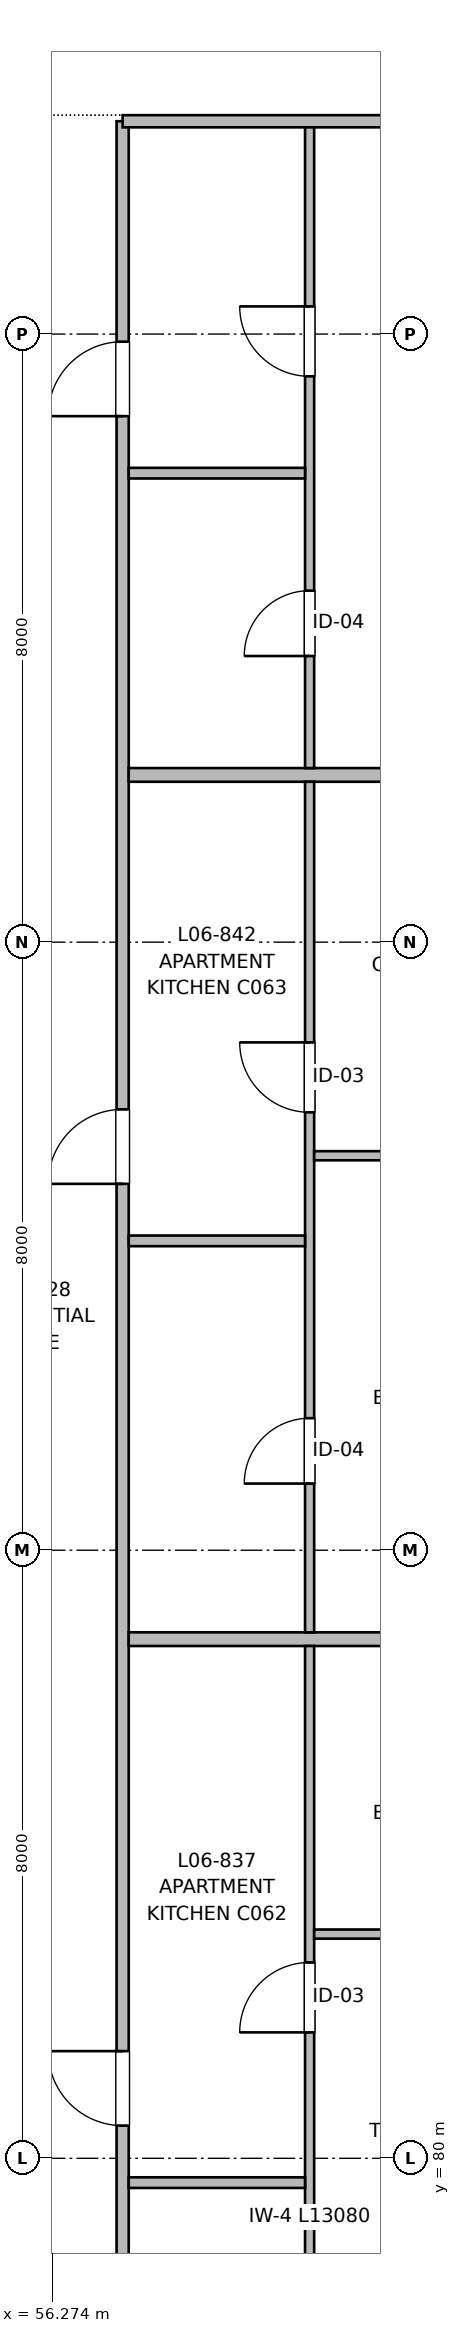
"""IFC4 building model, lengths in metres.
Left out: names, types, materials, properties, quantities, classifications, styles, units other than length and angle.
Written with IfcOpenShell. Run it as: python <this file> out.ifc"""

import sys

from ifc_helpers import new_model, si_unit, direction, frame, frame_2d, origin, place, context, subcontext, project, spatial, rectangle, extrude, element, fill, save


model = new_model("IFC4")
c1 = context("Model", 3, precision=1e-05, world=origin(), true_north=direction((0.0, 1.0)))
c2 = subcontext(c1, "Body", "Model", "MODEL_VIEW")
j1 = project(units=[si_unit("LENGTHUNIT", "METRE"), si_unit("PLANEANGLEUNIT", "RADIAN")], contexts=[c1])
p1 = place(None, origin())
s1 = spatial("IfcSite", under=j1, at=p1, CompositionType="ELEMENT")
p2 = place(p1, origin())
s2 = spatial("IfcBuilding", under=s1, at=p2, CompositionType="ELEMENT")
p3 = place(p2, frame((0.0, 0.0, 20.16)))
s3 = spatial("IfcBuildingStorey", under=s2, at=p3, CompositionType="ELEMENT", Elevation=20.16)
p4 = place(p3, frame((57.2, 59.36, 0.0), z_axis=(0.0, 0.0, 1.0), x_axis=(0.0, 1.0, 0.0)))
e1 = element("IfcWall", 1, at=p4, inside=s3, PredefinedType="PARTITIONING", context=c2, shape_type="SweptSolid", body=[
    extrude(rectangle(XDim=47.44, YDim=0.16, at=frame_2d((23.72, 0.0))), origin(), (0.0, 0.0, 1.0), 2.935),
])
p5 = place(p4, frame((7.25, 0.0, 0.0)))
e2 = element("IfcOpeningElement", 2, at=p5, cuts=e1, PredefinedType="OPENING", context=c2, shape_type="SweptSolid", body=[
    extrude(rectangle(XDim=0.98, YDim=2.15, at=frame_2d((0.49, 1.075))), frame((0.0, 0.09, 0.0), z_axis=(0.0, -1.0, 0.0), x_axis=(1.0, 0.0, 0.0)), (0.0, 0.0, 1.0), 0.18),
])
p6 = place(p4, frame((21.07, 0.0, 0.0)))
e3 = element("IfcOpeningElement", 3, at=p6, cuts=e1, PredefinedType="OPENING", context=c2, shape_type="SweptSolid", body=[
    extrude(rectangle(XDim=0.98, YDim=2.15, at=frame_2d((0.49, 1.075))), frame((0.0, 0.09, 0.0), z_axis=(0.0, -1.0, 0.0), x_axis=(1.0, 0.0, 0.0)), (0.0, 0.0, 1.0), 0.18),
])
p7 = place(p4, frame((33.46, 0.0, 0.0)))
e4 = element("IfcOpeningElement", 4, at=p7, cuts=e1, PredefinedType="OPENING", context=c2, shape_type="SweptSolid", body=[
    extrude(rectangle(XDim=0.98, YDim=2.15, at=frame_2d((0.49, 1.075))), frame((0.0, 0.09, 0.0), z_axis=(0.0, -1.0, 0.0), x_axis=(1.0, 0.0, 0.0)), (0.0, 0.0, 1.0), 0.18),
])
p8 = place(p4, frame((43.56, 0.0, 0.0)))
e5 = element("IfcOpeningElement", 5, at=p8, cuts=e1, PredefinedType="OPENING", context=c2, shape_type="SweptSolid", body=[
    extrude(rectangle(XDim=0.98, YDim=2.15, at=frame_2d((0.49, 1.075))), frame((0.0, 0.09, 0.0), z_axis=(0.0, -1.0, 0.0), x_axis=(1.0, 0.0, 0.0)), (0.0, 0.0, 1.0), 0.18),
])
p9 = place(p3, frame((57.2, 106.8, 0.0), z_axis=(0.0, 0.0, 1.0), x_axis=(1.0, 0.0, 0.0)))
e6 = element("IfcWall", 6, at=p9, inside=s3, PredefinedType="PARTITIONING", context=c2, shape_type="SweptSolid", body=[
    extrude(rectangle(XDim=24.14, YDim=0.16, at=frame_2d((12.07, 0.0))), origin(), (0.0, 0.0, 1.0), 2.935),
])
p10 = place(p9, frame((19.575, 0.0, 0.0)))
e7 = element("IfcOpeningElement", 7, at=p10, cuts=e6, PredefinedType="OPENING", context=c2, shape_type="SweptSolid", body=[
    extrude(rectangle(XDim=1.05, YDim=2.15, at=frame_2d((0.525, 1.075))), frame((0.0, 0.09, 0.0), z_axis=(0.0, -1.0, 0.0), x_axis=(1.0, 0.0, 0.0)), (0.0, 0.0, 1.0), 0.18),
])
p11 = place(p9, frame((8.995, 0.0, 0.0)))
e8 = element("IfcOpeningElement", 8, at=p11, cuts=e6, PredefinedType="OPENING", context=c2, shape_type="SweptSolid", body=[
    extrude(rectangle(XDim=0.98, YDim=2.15, at=frame_2d((0.49, 1.075))), frame((0.0, 0.09, 0.0), z_axis=(0.0, -1.0, 0.0), x_axis=(1.0, 0.0, 0.0)), (0.0, 0.0, 1.0), 0.18),
])
p12 = place(p3, frame((57.28, 86.83, 0.0), z_axis=(0.0, 0.0, 1.0), x_axis=(1.0, 0.0, 0.0)))
e9 = element("IfcWall", 9, at=p12, inside=s3, PredefinedType="PARTITIONING", context=c2, shape_type="SweptSolid", body=[
    extrude(rectangle(XDim=6.6, YDim=0.18, at=frame_2d((3.3, 0.0))), origin(), (0.0, 0.0, 1.0), 2.935),
])
p13 = place(p3, frame((57.28, 98.2, 0.0), z_axis=(0.0, 0.0, 1.0), x_axis=(1.0, 0.0, 0.0)))
e10 = element("IfcWall", 10, at=p13, inside=s3, PredefinedType="PARTITIONING", context=c2, shape_type="SweptSolid", body=[
    extrude(rectangle(XDim=16.412, YDim=0.18, at=frame_2d((8.206, 0.0))), origin(), (0.0, 0.0, 1.0), 2.935),
])
p14 = place(p3, frame((59.66, 73.66, 0.0), z_axis=(0.0, 0.0, 1.0), x_axis=(0.0, 1.0, 0.0)))
e11 = element("IfcWall", 11, at=p14, inside=s3, PredefinedType="PARTITIONING", context=c2, shape_type="SweptSolid", body=[
    extrude(rectangle(XDim=13.08, YDim=0.12, at=frame_2d((6.54, 0.0))), origin(), (0.0, 0.0, 1.0), 2.935),
])
p15 = place(p14, frame((2.288, 0.0, 0.0)))
e12 = element("IfcOpeningElement", 12, at=p15, cuts=e11, PredefinedType="OPENING", context=c2, shape_type="SweptSolid", body=[
    extrude(rectangle(XDim=0.86, YDim=2.1, at=frame_2d((0.43, 1.05))), frame((0.0, 0.07, 0.0), z_axis=(0.0, -1.0, 0.0), x_axis=(1.0, 0.0, 0.0)), (0.0, 0.0, 1.0), 0.14),
])
p16 = place(p14, frame((7.997, 0.0, 0.0)))
e13 = element("IfcOpeningElement", 13, at=p16, cuts=e11, PredefinedType="OPENING", context=c2, shape_type="SweptSolid", body=[
    extrude(rectangle(XDim=0.92, YDim=2.1, at=frame_2d((0.46, 1.05))), frame((0.0, 0.07, 0.0), z_axis=(0.0, -1.0, 0.0), x_axis=(1.0, 0.0, 0.0)), (0.0, 0.0, 1.0), 0.14),
])
p17 = place(p3, frame((57.28, 79.68, 0.0), z_axis=(0.0, 0.0, 1.0), x_axis=(1.0, 0.0, 0.0)))
e14 = element("IfcWall", 14, at=p17, inside=s3, PredefinedType="PARTITIONING", context=c2, shape_type="SweptSolid", body=[
    extrude(rectangle(XDim=2.32, YDim=0.14, at=frame_2d((1.16, 0.0))), origin(), (0.0, 0.0, 1.0), 2.935),
])
p18 = place(p3, frame((59.72, 82.95, 0.0), z_axis=(0.0, 0.0, 1.0), x_axis=(1.0, 0.0, 0.0)))
e15 = element("IfcWall", 15, at=p18, inside=s3, PredefinedType="PARTITIONING", context=c2, shape_type="SweptSolid", body=[
    extrude(rectangle(XDim=4.16, YDim=0.12, at=frame_2d((2.08, 0.0))), origin(), (0.0, 0.0, 1.0), 2.935),
])
p19 = place(p18, frame((1.64, 0.0, 0.0)))
e16 = element("IfcOpeningElement", 16, at=p19, cuts=e15, PredefinedType="OPENING", context=c2, shape_type="SweptSolid", body=[
    extrude(rectangle(XDim=0.88, YDim=2.1, at=frame_2d((0.44, 1.05))), frame((0.0, 0.07, 0.0), z_axis=(0.0, -1.0, 0.0), x_axis=(1.0, 0.0, 0.0)), (0.0, 0.0, 1.0), 0.14),
])
p20 = place(p3, frame((59.66, 86.92, 0.0), z_axis=(0.0, 0.0, 1.0), x_axis=(0.0, 1.0, 0.0)))
e17 = element("IfcWall", 17, at=p20, inside=s3, PredefinedType="PARTITIONING", context=c2, shape_type="SweptSolid", body=[
    extrude(rectangle(XDim=11.19, YDim=0.12, at=frame_2d((5.595, 0.0))), origin(), (0.0, 0.0, 1.0), 2.935),
])
p21 = place(p20, frame((1.957, 0.0, 0.0)))
e18 = element("IfcOpeningElement", 18, at=p21, cuts=e17, PredefinedType="OPENING", context=c2, shape_type="SweptSolid", body=[
    extrude(rectangle(XDim=0.86, YDim=2.1, at=frame_2d((0.43, 1.05))), frame((0.0, 0.07, 0.0), z_axis=(0.0, -1.0, 0.0), x_axis=(1.0, 0.0, 0.0)), (0.0, 0.0, 1.0), 0.14),
])
p22 = place(p20, frame((6.841, 0.0, 0.0)))
e19 = element("IfcOpeningElement", 19, at=p22, cuts=e17, PredefinedType="OPENING", context=c2, shape_type="SweptSolid", body=[
    extrude(rectangle(XDim=0.92, YDim=2.1, at=frame_2d((0.46, 1.05))), frame((0.0, 0.07, 0.0), z_axis=(0.0, -1.0, 0.0), x_axis=(1.0, 0.0, 0.0)), (0.0, 0.0, 1.0), 0.14),
])
p23 = place(p3, frame((57.28, 92.07, 0.0), z_axis=(0.0, 0.0, 1.0), x_axis=(1.0, 0.0, 0.0)))
e20 = element("IfcWall", 20, at=p23, inside=s3, PredefinedType="PARTITIONING", context=c2, shape_type="SweptSolid", body=[
    extrude(rectangle(XDim=2.32, YDim=0.14, at=frame_2d((1.16, 0.0))), origin(), (0.0, 0.0, 1.0), 2.935),
])
p24 = place(p3, frame((59.72, 93.19, 0.0), z_axis=(0.0, 0.0, 1.0), x_axis=(1.0, 0.0, 0.0)))
e21 = element("IfcWall", 21, at=p24, inside=s3, PredefinedType="PARTITIONING", context=c2, shape_type="SweptSolid", body=[
    extrude(rectangle(XDim=8.537, YDim=0.12, at=frame_2d((4.269, 0.0))), origin(), (0.0, 0.0, 1.0), 2.935),
])
p25 = place(p24, frame((1.63, 0.0, 0.0)))
e22 = element("IfcOpeningElement", 22, at=p25, cuts=e21, PredefinedType="OPENING", context=c2, shape_type="SweptSolid", body=[
    extrude(rectangle(XDim=0.9, YDim=2.1, at=frame_2d((0.45, 1.05))), frame((0.0, 0.07, 0.0), z_axis=(0.0, -1.0, 0.0), x_axis=(1.0, 0.0, 0.0)), (0.0, 0.0, 1.0), 0.14),
])
p26 = place(p3, frame((59.66, 98.29, 0.0), z_axis=(0.0, 0.0, 1.0), x_axis=(0.0, 1.0, 0.0)))
e23 = element("IfcWall", 23, at=p26, inside=s3, PredefinedType="PARTITIONING", context=c2, shape_type="SweptSolid", body=[
    extrude(rectangle(XDim=8.43, YDim=0.12, at=frame_2d((4.215, 0.0))), origin(), (0.0, 0.0, 1.0), 2.935),
])
p27 = place(p26, frame((1.474, 0.0, 0.0)))
e24 = element("IfcOpeningElement", 24, at=p27, cuts=e23, PredefinedType="OPENING", context=c2, shape_type="SweptSolid", body=[
    extrude(rectangle(XDim=0.86, YDim=2.1, at=frame_2d((0.43, 1.05))), frame((0.0, 0.07, 0.0), z_axis=(0.0, -1.0, 0.0), x_axis=(1.0, 0.0, 0.0)), (0.0, 0.0, 1.0), 0.14),
])
p28 = place(p26, frame((5.154, 0.0, 0.0)))
e25 = element("IfcOpeningElement", 25, at=p28, cuts=e23, PredefinedType="OPENING", context=c2, shape_type="SweptSolid", body=[
    extrude(rectangle(XDim=0.92, YDim=2.1, at=frame_2d((0.46, 1.05))), frame((0.0, 0.07, 0.0), z_axis=(0.0, -1.0, 0.0), x_axis=(1.0, 0.0, 0.0)), (0.0, 0.0, 1.0), 0.14),
])
p29 = place(p3, frame((57.28, 102.17, 0.0), z_axis=(0.0, 0.0, 1.0), x_axis=(1.0, 0.0, 0.0)))
e26 = element("IfcWall", 26, at=p29, inside=s3, PredefinedType="PARTITIONING", context=c2, shape_type="SweptSolid", body=[
    extrude(rectangle(XDim=2.32, YDim=0.14, at=frame_2d((1.16, 0.0))), origin(), (0.0, 0.0, 1.0), 2.935),
])
p30 = place(p16, origin())
e27 = element("IfcDoor", 27, at=p30, inside=s3, OperationType="SINGLE_SWING_LEFT", PredefinedType="DOOR", context=c2, shape_type="SweptSolid", body=[
    extrude(rectangle(XDim=0.92, YDim=2.1, at=frame_2d((0.46, 1.05))), frame((0.0, 0.025, 0.0), z_axis=(0.0, -1.0, 0.0), x_axis=(1.0, 0.0, 0.0)), (0.0, 0.0, 1.0), 0.05),
])
fill(e13, e27)
p31 = place(p6, origin())
e28 = element("IfcDoor", 28, at=p31, inside=s3, OperationType="SINGLE_SWING_RIGHT", PredefinedType="DOOR", context=c2, shape_type="SweptSolid", body=[
    extrude(rectangle(XDim=0.98, YDim=2.15, at=frame_2d((0.49, 1.075))), frame((0.0, 0.025, 0.0), z_axis=(0.0, -1.0, 0.0), x_axis=(1.0, 0.0, 0.0)), (0.0, 0.0, 1.0), 0.05),
])
fill(e3, e28)
p32 = place(p21, origin())
e29 = element("IfcDoor", 29, at=p32, inside=s3, OperationType="SINGLE_SWING_LEFT", PredefinedType="DOOR", context=c2, shape_type="SweptSolid", body=[
    extrude(rectangle(XDim=0.86, YDim=2.1, at=frame_2d((0.43, 1.05))), frame((0.0, 0.025, 0.0), z_axis=(0.0, -1.0, 0.0), x_axis=(1.0, 0.0, 0.0)), (0.0, 0.0, 1.0), 0.05),
])
fill(e18, e29)
p33 = place(p22, origin())
e30 = element("IfcDoor", 30, at=p33, inside=s3, OperationType="SINGLE_SWING_RIGHT", PredefinedType="DOOR", context=c2, shape_type="SweptSolid", body=[
    extrude(rectangle(XDim=0.92, YDim=2.1, at=frame_2d((0.46, 1.05))), frame((0.0, 0.025, 0.0), z_axis=(0.0, -1.0, 0.0), x_axis=(1.0, 0.0, 0.0)), (0.0, 0.0, 1.0), 0.05),
])
fill(e19, e30)
p34 = place(p7, origin())
e31 = element("IfcDoor", 31, at=p34, inside=s3, OperationType="SINGLE_SWING_LEFT", PredefinedType="DOOR", context=c2, shape_type="SweptSolid", body=[
    extrude(rectangle(XDim=0.98, YDim=2.15, at=frame_2d((0.49, 1.075))), frame((0.0, 0.025, 0.0), z_axis=(0.0, -1.0, 0.0), x_axis=(1.0, 0.0, 0.0)), (0.0, 0.0, 1.0), 0.05),
])
fill(e4, e31)
p35 = place(p27, origin())
e32 = element("IfcDoor", 32, at=p35, inside=s3, OperationType="SINGLE_SWING_LEFT", PredefinedType="DOOR", context=c2, shape_type="SweptSolid", body=[
    extrude(rectangle(XDim=0.86, YDim=2.1, at=frame_2d((0.43, 1.05))), frame((0.0, 0.025, 0.0), z_axis=(0.0, -1.0, 0.0), x_axis=(1.0, 0.0, 0.0)), (0.0, 0.0, 1.0), 0.05),
])
fill(e24, e32)
p36 = place(p28, origin())
e33 = element("IfcDoor", 33, at=p36, inside=s3, OperationType="SINGLE_SWING_RIGHT", PredefinedType="DOOR", context=c2, shape_type="SweptSolid", body=[
    extrude(rectangle(XDim=0.92, YDim=2.1, at=frame_2d((0.46, 1.05))), frame((0.0, 0.025, 0.0), z_axis=(0.0, -1.0, 0.0), x_axis=(1.0, 0.0, 0.0)), (0.0, 0.0, 1.0), 0.05),
])
fill(e25, e33)
p37 = place(p8, origin())
e34 = element("IfcDoor", 34, at=p37, inside=s3, OperationType="SINGLE_SWING_LEFT", PredefinedType="DOOR", context=c2, shape_type="SweptSolid", body=[
    extrude(rectangle(XDim=0.98, YDim=2.15, at=frame_2d((0.49, 1.075))), frame((0.0, 0.025, 0.0), z_axis=(0.0, -1.0, 0.0), x_axis=(1.0, 0.0, 0.0)), (0.0, 0.0, 1.0), 0.05),
])
fill(e5, e34)
save(model, sys.argv[1])
